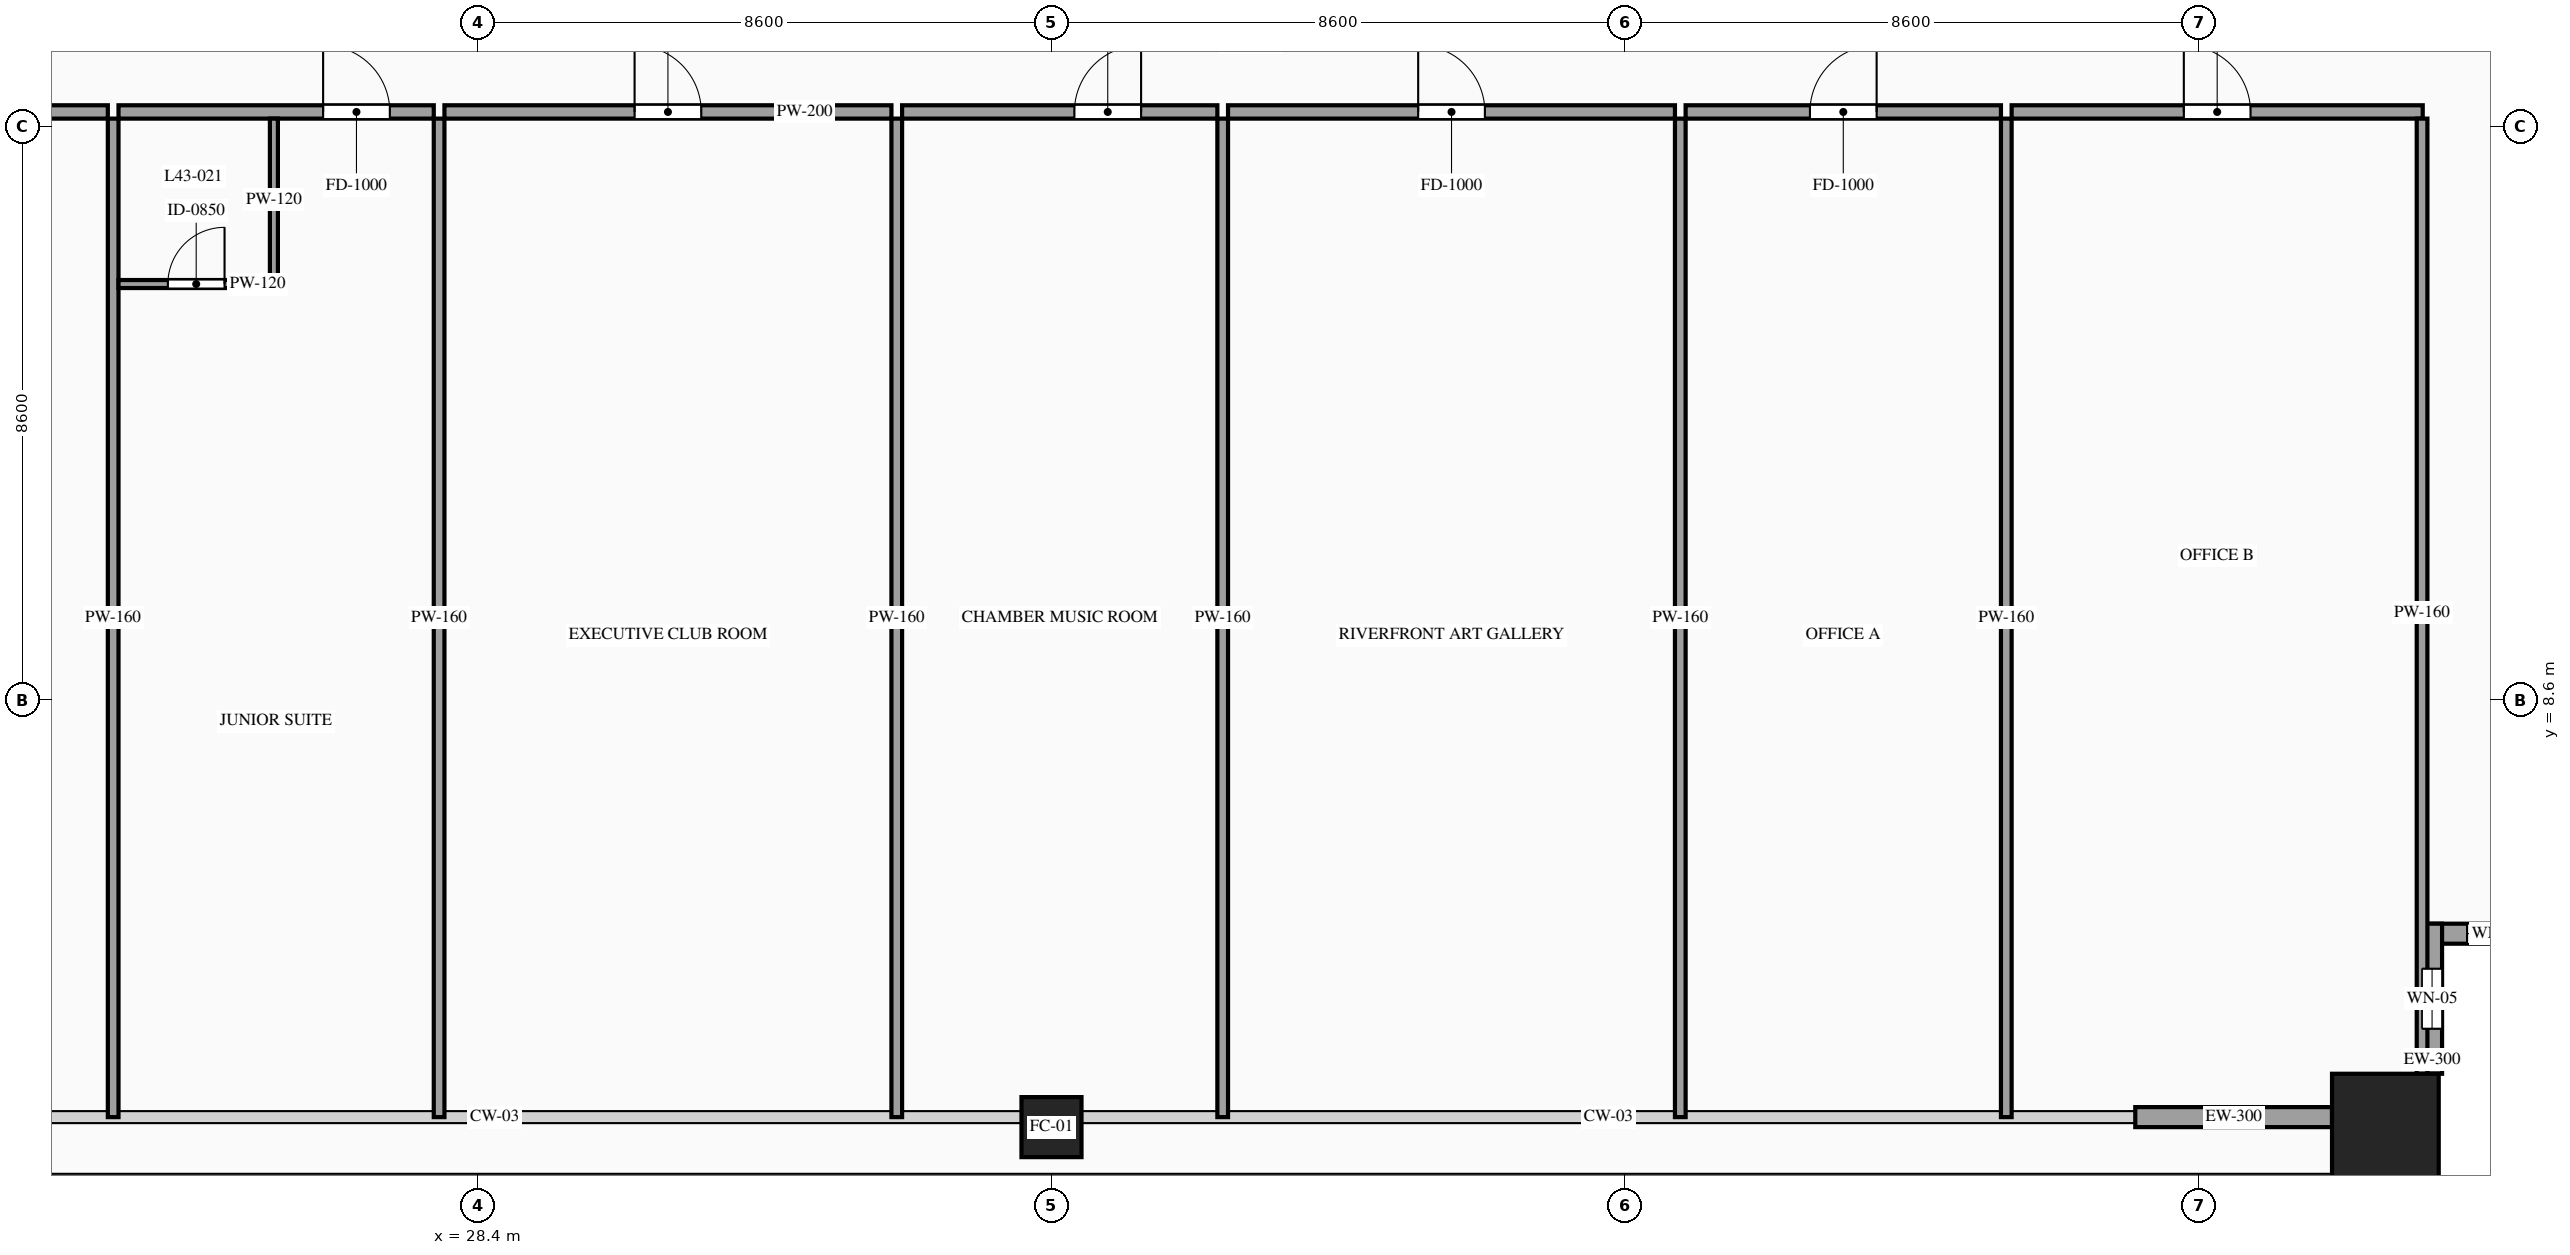
"""IFC4 building model, lengths in metres.
Left out: names, types, materials, properties, quantities, classifications, styles, units other than length and angle.
Written with IfcOpenShell. Run it as: python <this file> out.ifc"""

import sys

from ifc_helpers import new_model, si_unit, direction, frame, frame_2d, origin, origin_2d, place, context, subcontext, project, spatial, rectangle, hollow_rectangle, extrude, source, transform, mapped, element, fill, save


model = new_model("IFC4")
c1 = context("Model", 3, precision=1e-05, world=origin(), true_north=direction((0.0, 1.0)))
c2 = subcontext(c1, "Body", "Model", "MODEL_VIEW")
j1 = project(units=[si_unit("LENGTHUNIT", "METRE"), si_unit("PLANEANGLEUNIT", "RADIAN")], contexts=[c1])
p1 = place(None, origin())
s1 = spatial("IfcSite", under=j1, at=p1, CompositionType="ELEMENT")
p2 = place(p1, origin())
s2 = spatial("IfcBuilding", under=s1, at=p2, CompositionType="ELEMENT")
p3 = place(p2, frame((0.0, 0.0, 163.2)))
s3 = spatial("IfcBuildingStorey", under=s2, at=p3, CompositionType="ELEMENT", Elevation=163.2)
m1 = source(origin(), c2, "Body", "SweptSolid", [
    extrude(hollow_rectangle(XDim=0.9, YDim=0.9, WallThickness=0.042, at=origin_2d()), origin(), (0.0, 0.0, 1.0), 3.05),
])
p4 = place(p3, frame((37.0, 2.2, 0.0), z_axis=(0.0, 0.0, 1.0), x_axis=(1.0, 0.0, 0.0)))
e1 = element("IfcColumn", 1, at=p4, inside=s3, PredefinedType="COLUMN", context=c2, shape_type="MappedRepresentation", body=[
    mapped(m1, transform((0.0, 0.0, 0.0), scale=1.0)),
])
m2 = source(origin(), c2, "Body", "SweptSolid", [
    extrude(hollow_rectangle(XDim=1.6, YDim=1.6, WallThickness=0.07, at=origin_2d()), origin(), (0.0, 0.0, 1.0), 3.3),
])
p5 = place(p3, frame((57.0, 2.2, 0.0), z_axis=(0.0, 0.0, 1.0), x_axis=(1.0, 0.0, 0.0)))
e2 = element("IfcColumn", 2, at=p5, inside=s3, PredefinedType="COLUMN", context=c2, shape_type="MappedRepresentation", body=[
    mapped(m2, transform((0.0, 0.0, 0.0), scale=1.0)),
])
p6 = place(p3, frame((57.55, 5.1, 0.0), z_axis=(0.0, 0.0, 1.0), x_axis=(1.0, 0.0, 0.0)))
e3 = element("IfcWall", 3, at=p6, inside=s3, PredefinedType="SOLIDWALL", context=c2, shape_type="SweptSolid", body=[
    extrude(rectangle(XDim=2.25, YDim=0.3, at=frame_2d((1.125, 0.0))), origin(), (0.0, 0.0, 1.0), 3.3),
])
p7 = place(p6, frame((0.675, 0.0, 0.85)))
e4 = element("IfcOpeningElement", 4, at=p7, cuts=e3, PredefinedType="OPENING", context=c2, shape_type="SweptSolid", body=[
    extrude(rectangle(XDim=0.9, YDim=1.5, at=frame_2d((0.45, 0.75))), frame((0.0, 0.165, 0.0), z_axis=(0.0, -1.0, 0.0), x_axis=(1.0, 0.0, 0.0)), (0.0, 0.0, 1.0), 0.33),
])
p8 = place(p3, frame((57.7, 3.0, 0.0), z_axis=(0.0, 0.0, 1.0), x_axis=(0.0, 1.0, 0.0)))
e5 = element("IfcWall", 5, at=p8, inside=s3, PredefinedType="SOLIDWALL", context=c2, shape_type="SweptSolid", body=[
    extrude(rectangle(XDim=2.25, YDim=0.3, at=frame_2d((1.125, 0.0))), origin(), (0.0, 0.0, 1.0), 3.05),
])
p9 = place(p8, frame((0.675, 0.0, 0.75)))
e6 = element("IfcOpeningElement", 6, at=p9, cuts=e5, PredefinedType="OPENING", context=c2, shape_type="SweptSolid", body=[
    extrude(rectangle(XDim=0.9, YDim=1.5, at=frame_2d((0.45, 0.75))), frame((0.0, 0.165, 0.0), z_axis=(0.0, -1.0, 0.0), x_axis=(1.0, 0.0, 0.0)), (0.0, 0.0, 1.0), 0.33),
])
m3 = source(origin(), c2, "Body", "SweptSolid", [
    extrude(rectangle(XDim=2.95, YDim=0.3, at=frame_2d((1.475, 0.0))), origin(), (0.0, 0.0, 1.0), 2.445),
])
p10 = place(p3, frame((53.25, 2.35, 0.0), z_axis=(0.0, 0.0, 1.0), x_axis=(1.0, 0.0, 0.0)))
e7 = element("IfcWall", 7, at=p10, inside=s3, PredefinedType="SOLIDWALL", context=c2, shape_type="MappedRepresentation", body=[
    mapped(m3, transform((0.0, 0.0, 0.0), scale=1.0)),
])
p11 = place(p3, frame((16.44, 17.42, 0.0), z_axis=(0.0, 0.0, 1.0), x_axis=(1.0, 0.0, 0.0)))
e8 = element("IfcWall", 8, at=p11, inside=s3, PredefinedType="PARTITIONING", context=c2, shape_type="SweptSolid", body=[
    extrude(rectangle(XDim=6.411, YDim=0.2, at=frame_2d((3.206, 0.0))), origin(), (0.0, 0.0, 1.0), 3.05),
])
p12 = place(p11, frame((3.911, 0.0, 0.0)))
e9 = element("IfcOpeningElement", 9, at=p12, cuts=e8, PredefinedType="OPENING", context=c2, shape_type="SweptSolid", body=[
    extrude(rectangle(XDim=1.0, YDim=2.2, at=frame_2d((0.5, 1.1))), frame((0.0, 0.115, 0.0), z_axis=(0.0, -1.0, 0.0), x_axis=(1.0, 0.0, 0.0)), (0.0, 0.0, 1.0), 0.23),
])
m4 = source(origin(), c2, "Body", "SweptSolid", [
    extrude(rectangle(XDim=14.97, YDim=0.16, at=frame_2d((7.485, 0.0))), origin(), (0.0, 0.0, 1.0), 3.05),
])
p13 = place(p3, frame((22.931, 2.35, 0.0), z_axis=(0.0, 0.0, 1.0), x_axis=(0.0, 1.0, 0.0)))
e10 = element("IfcWall", 10, at=p13, inside=s3, PredefinedType="PARTITIONING", context=c2, shape_type="MappedRepresentation", body=[
    mapped(m4, transform((0.0, 0.0, 0.0), scale=1.0)),
])
p14 = place(p3, frame((23.011, 17.42, 0.0), z_axis=(0.0, 0.0, 1.0), x_axis=(1.0, 0.0, 0.0)))
e11 = element("IfcWall", 11, at=p14, inside=s3, PredefinedType="PARTITIONING", context=c2, shape_type="SweptSolid", body=[
    extrude(rectangle(XDim=4.727, YDim=0.2, at=frame_2d((2.364, 0.0))), origin(), (0.0, 0.0, 1.0), 3.05),
])
p15 = place(p14, frame((3.068, 0.0, 0.0)))
e12 = element("IfcOpeningElement", 12, at=p15, cuts=e11, PredefinedType="OPENING", context=c2, shape_type="SweptSolid", body=[
    extrude(rectangle(XDim=1.0, YDim=2.2, at=frame_2d((0.5, 1.1))), frame((0.0, 0.115, 0.0), z_axis=(0.0, -1.0, 0.0), x_axis=(1.0, 0.0, 0.0)), (0.0, 0.0, 1.0), 0.23),
])
p16 = place(p3, frame((27.818, 2.35, 0.0), z_axis=(0.0, 0.0, 1.0), x_axis=(0.0, 1.0, 0.0)))
e13 = element("IfcWall", 13, at=p16, inside=s3, PredefinedType="PARTITIONING", context=c2, shape_type="MappedRepresentation", body=[
    mapped(m4, transform((0.0, 0.0, 0.0), scale=1.0)),
])
p17 = place(p3, frame((23.011, 14.84, 0.0), z_axis=(0.0, 0.0, 1.0), x_axis=(1.0, 0.0, 0.0)))
e14 = element("IfcWall", 14, at=p17, inside=s3, PredefinedType="PARTITIONING", context=c2, shape_type="SweptSolid", body=[
    extrude(rectangle(XDim=2.33, YDim=0.12, at=frame_2d((1.165, 0.0))), origin(), (0.0, 0.0, 1.0), 3.05),
])
p18 = place(p17, frame((0.74, 0.0, 0.0)))
e15 = element("IfcOpeningElement", 15, at=p18, cuts=e14, PredefinedType="OPENING", context=c2, shape_type="SweptSolid", body=[
    extrude(rectangle(XDim=0.85, YDim=2.1, at=frame_2d((0.425, 1.05))), frame((0.0, 0.075, 0.0), z_axis=(0.0, -1.0, 0.0), x_axis=(1.0, 0.0, 0.0)), (0.0, 0.0, 1.0), 0.15),
])
m5 = source(origin(), c2, "Body", "SweptSolid", [
    extrude(rectangle(XDim=2.42, YDim=0.12, at=frame_2d((1.21, 0.0))), origin(), (0.0, 0.0, 1.0), 3.05),
])
p19 = place(p3, frame((25.341, 14.9, 0.0), z_axis=(0.0, 0.0, 1.0), x_axis=(0.0, 1.0, 0.0)))
e16 = element("IfcWall", 16, at=p19, inside=s3, PredefinedType="PARTITIONING", context=c2, shape_type="MappedRepresentation", body=[
    mapped(m5, transform((0.0, 0.0, 0.0), scale=1.0)),
])
p20 = place(p3, frame((27.898, 17.42, 0.0), z_axis=(0.0, 0.0, 1.0), x_axis=(1.0, 0.0, 0.0)))
e17 = element("IfcWall", 17, at=p20, inside=s3, PredefinedType="PARTITIONING", context=c2, shape_type="SweptSolid", body=[
    extrude(rectangle(XDim=6.702, YDim=0.2, at=frame_2d((3.351, 0.0))), origin(), (0.0, 0.0, 1.0), 3.05),
])
p21 = place(p20, frame((2.851, 0.0, 0.0)))
e18 = element("IfcOpeningElement", 18, at=p21, cuts=e17, PredefinedType="OPENING", context=c2, shape_type="SweptSolid", body=[
    extrude(rectangle(XDim=1.0, YDim=2.2, at=frame_2d((0.5, 1.1))), frame((0.0, 0.115, 0.0), z_axis=(0.0, -1.0, 0.0), x_axis=(1.0, 0.0, 0.0)), (0.0, 0.0, 1.0), 0.23),
])
p22 = place(p3, frame((34.68, 2.35, 0.0), z_axis=(0.0, 0.0, 1.0), x_axis=(0.0, 1.0, 0.0)))
e19 = element("IfcWall", 19, at=p22, inside=s3, PredefinedType="PARTITIONING", context=c2, shape_type="MappedRepresentation", body=[
    mapped(m4, transform((0.0, 0.0, 0.0), scale=1.0)),
])
p23 = place(p3, frame((34.76, 17.42, 0.0), z_axis=(0.0, 0.0, 1.0), x_axis=(1.0, 0.0, 0.0)))
e20 = element("IfcWall", 20, at=p23, inside=s3, PredefinedType="PARTITIONING", context=c2, shape_type="SweptSolid", body=[
    extrude(rectangle(XDim=4.727, YDim=0.2, at=frame_2d((2.364, 0.0))), origin(), (0.0, 0.0, 1.0), 3.05),
])
p24 = place(p23, frame((2.583, 0.0, 0.0)))
e21 = element("IfcOpeningElement", 21, at=p24, cuts=e20, PredefinedType="OPENING", context=c2, shape_type="SweptSolid", body=[
    extrude(rectangle(XDim=1.0, YDim=2.2, at=frame_2d((0.5, 1.1))), frame((0.0, 0.115, 0.0), z_axis=(0.0, -1.0, 0.0), x_axis=(1.0, 0.0, 0.0)), (0.0, 0.0, 1.0), 0.23),
])
p25 = place(p3, frame((39.567, 2.35, 0.0), z_axis=(0.0, 0.0, 1.0), x_axis=(0.0, 1.0, 0.0)))
e22 = element("IfcWall", 22, at=p25, inside=s3, PredefinedType="PARTITIONING", context=c2, shape_type="MappedRepresentation", body=[
    mapped(m4, transform((0.0, 0.0, 0.0), scale=1.0)),
])
p26 = place(p3, frame((39.647, 17.42, 0.0), z_axis=(0.0, 0.0, 1.0), x_axis=(1.0, 0.0, 0.0)))
e23 = element("IfcWall", 23, at=p26, inside=s3, PredefinedType="PARTITIONING", context=c2, shape_type="SweptSolid", body=[
    extrude(rectangle(XDim=6.701, YDim=0.2, at=frame_2d((3.351, 0.0))), origin(), (0.0, 0.0, 1.0), 3.05),
])
p27 = place(p26, frame((2.851, 0.0, 0.0)))
e24 = element("IfcOpeningElement", 24, at=p27, cuts=e23, PredefinedType="OPENING", context=c2, shape_type="SweptSolid", body=[
    extrude(rectangle(XDim=1.0, YDim=2.2, at=frame_2d((0.5, 1.1))), frame((0.0, 0.115, 0.0), z_axis=(0.0, -1.0, 0.0), x_axis=(1.0, 0.0, 0.0)), (0.0, 0.0, 1.0), 0.23),
])
p28 = place(p3, frame((46.428, 2.35, 0.0), z_axis=(0.0, 0.0, 1.0), x_axis=(0.0, 1.0, 0.0)))
e25 = element("IfcWall", 25, at=p28, inside=s3, PredefinedType="PARTITIONING", context=c2, shape_type="MappedRepresentation", body=[
    mapped(m4, transform((0.0, 0.0, 0.0), scale=1.0)),
])
p29 = place(p3, frame((46.508, 17.42, 0.0), z_axis=(0.0, 0.0, 1.0), x_axis=(1.0, 0.0, 0.0)))
e26 = element("IfcWall", 26, at=p29, inside=s3, PredefinedType="PARTITIONING", context=c2, shape_type="SweptSolid", body=[
    extrude(rectangle(XDim=4.728, YDim=0.2, at=frame_2d((2.364, 0.0))), origin(), (0.0, 0.0, 1.0), 3.05),
])
p30 = place(p29, frame((1.864, 0.0, 0.0)))
e27 = element("IfcOpeningElement", 27, at=p30, cuts=e26, PredefinedType="OPENING", context=c2, shape_type="SweptSolid", body=[
    extrude(rectangle(XDim=1.0, YDim=2.2, at=frame_2d((0.5, 1.1))), frame((0.0, 0.115, 0.0), z_axis=(0.0, -1.0, 0.0), x_axis=(1.0, 0.0, 0.0)), (0.0, 0.0, 1.0), 0.23),
])
p31 = place(p3, frame((51.316, 2.35, 0.0), z_axis=(0.0, 0.0, 1.0), x_axis=(0.0, 1.0, 0.0)))
e28 = element("IfcWall", 28, at=p31, inside=s3, PredefinedType="PARTITIONING", context=c2, shape_type="MappedRepresentation", body=[
    mapped(m4, transform((0.0, 0.0, 0.0), scale=1.0)),
])
p32 = place(p3, frame((51.396, 17.42, 0.0), z_axis=(0.0, 0.0, 1.0), x_axis=(1.0, 0.0, 0.0)))
e29 = element("IfcWall", 29, at=p32, inside=s3, PredefinedType="PARTITIONING", context=c2, shape_type="SweptSolid", body=[
    extrude(rectangle(XDim=6.164, YDim=0.2, at=frame_2d((3.082, 0.0))), origin(), (0.0, 0.0, 1.0), 3.05),
])
p33 = place(p32, frame((2.582, 0.0, 0.0)))
e30 = element("IfcOpeningElement", 30, at=p33, cuts=e29, PredefinedType="OPENING", context=c2, shape_type="SweptSolid", body=[
    extrude(rectangle(XDim=1.0, YDim=2.2, at=frame_2d((0.5, 1.1))), frame((0.0, 0.115, 0.0), z_axis=(0.0, -1.0, 0.0), x_axis=(1.0, 0.0, 0.0)), (0.0, 0.0, 1.0), 0.23),
])
m6 = source(origin(), c2, "Body", "SweptSolid", [
    extrude(rectangle(XDim=14.82, YDim=0.16, at=frame_2d((7.41, 0.0))), origin(), (0.0, 0.0, 1.0), 3.05),
])
p34 = place(p3, frame((57.55, 2.5, 0.0), z_axis=(0.0, 0.0, 1.0), x_axis=(0.0, 1.0, 0.0)))
e31 = element("IfcWall", 31, at=p34, inside=s3, PredefinedType="PARTITIONING", context=c2, shape_type="MappedRepresentation", body=[
    mapped(m6, transform((0.0, 0.0, 0.0), scale=1.0)),
])
m7 = source(origin(), c2, "Body", "SweptSolid", [
    extrude(rectangle(XDim=0.9, YDim=1.5, at=frame_2d((0.45, 0.75))), frame((0.0, 0.03, 0.0), z_axis=(0.0, -1.0, 0.0), x_axis=(1.0, 0.0, 0.0)), (0.0, 0.0, 1.0), 0.06),
])
p35 = place(p7, origin())
e32 = element("IfcWindow", 32, at=p35, inside=s3, PartitioningType="SINGLE_PANEL", PredefinedType="WINDOW", context=c2, shape_type="MappedRepresentation", body=[
    mapped(m7, transform((0.0, 0.0, 0.0), scale=1.0)),
])
fill(e4, e32)
p36 = place(p9, origin())
e33 = element("IfcWindow", 33, at=p36, inside=s3, PartitioningType="SINGLE_PANEL", PredefinedType="WINDOW", context=c2, shape_type="MappedRepresentation", body=[
    mapped(m7, transform((0.0, 0.0, 0.0), scale=1.0)),
])
fill(e6, e33)
m8 = source(origin(), c2, "Body", "SweptSolid", [
    extrude(rectangle(XDim=1.0, YDim=2.2, at=frame_2d((0.5, 1.1))), frame((0.0, 0.025, 0.0), z_axis=(0.0, -1.0, 0.0), x_axis=(1.0, 0.0, 0.0)), (0.0, 0.0, 1.0), 0.05),
])
p37 = place(p15, origin())
e34 = element("IfcDoor", 34, at=p37, inside=s3, OperationType="SINGLE_SWING_LEFT", PredefinedType="DOOR", context=c2, shape_type="MappedRepresentation", body=[
    mapped(m8, transform((0.0, 0.0, 0.0), scale=1.0)),
])
fill(e12, e34)
m9 = source(origin(), c2, "Body", "SweptSolid", [
    extrude(rectangle(XDim=0.85, YDim=2.1, at=frame_2d((0.425, 1.05))), frame((0.0, 0.025, 0.0), z_axis=(0.0, -1.0, 0.0), x_axis=(1.0, 0.0, 0.0)), (0.0, 0.0, 1.0), 0.05),
])
p38 = place(p18, origin())
e35 = element("IfcDoor", 35, at=p38, inside=s3, OperationType="SINGLE_SWING_RIGHT", PredefinedType="DOOR", context=c2, shape_type="MappedRepresentation", body=[
    mapped(m9, transform((0.0, 0.0, 0.0), scale=1.0)),
])
fill(e15, e35)
p39 = place(p21, origin())
e36 = element("IfcDoor", 36, at=p39, inside=s3, OperationType="SINGLE_SWING_LEFT", PredefinedType="DOOR", context=c2, shape_type="MappedRepresentation", body=[
    mapped(m8, transform((0.0, 0.0, 0.0), scale=1.0)),
])
fill(e18, e36)
p40 = place(p24, origin())
e37 = element("IfcDoor", 37, at=p40, inside=s3, OperationType="SINGLE_SWING_RIGHT", PredefinedType="DOOR", context=c2, shape_type="MappedRepresentation", body=[
    mapped(m8, transform((0.0, 0.0, 0.0), scale=1.0)),
])
fill(e21, e37)
p41 = place(p27, origin())
e38 = element("IfcDoor", 38, at=p41, inside=s3, OperationType="SINGLE_SWING_LEFT", PredefinedType="DOOR", context=c2, shape_type="MappedRepresentation", body=[
    mapped(m8, transform((0.0, 0.0, 0.0), scale=1.0)),
])
fill(e24, e38)
p42 = place(p30, origin())
e39 = element("IfcDoor", 39, at=p42, inside=s3, OperationType="SINGLE_SWING_RIGHT", PredefinedType="DOOR", context=c2, shape_type="MappedRepresentation", body=[
    mapped(m8, transform((0.0, 0.0, 0.0), scale=1.0)),
])
fill(e27, e39)
p43 = place(p33, origin())
e40 = element("IfcDoor", 40, at=p43, inside=s3, OperationType="SINGLE_SWING_LEFT", PredefinedType="DOOR", context=c2, shape_type="MappedRepresentation", body=[
    mapped(m8, transform((0.0, 0.0, 0.0), scale=1.0)),
])
fill(e30, e40)
save(model, sys.argv[1])
